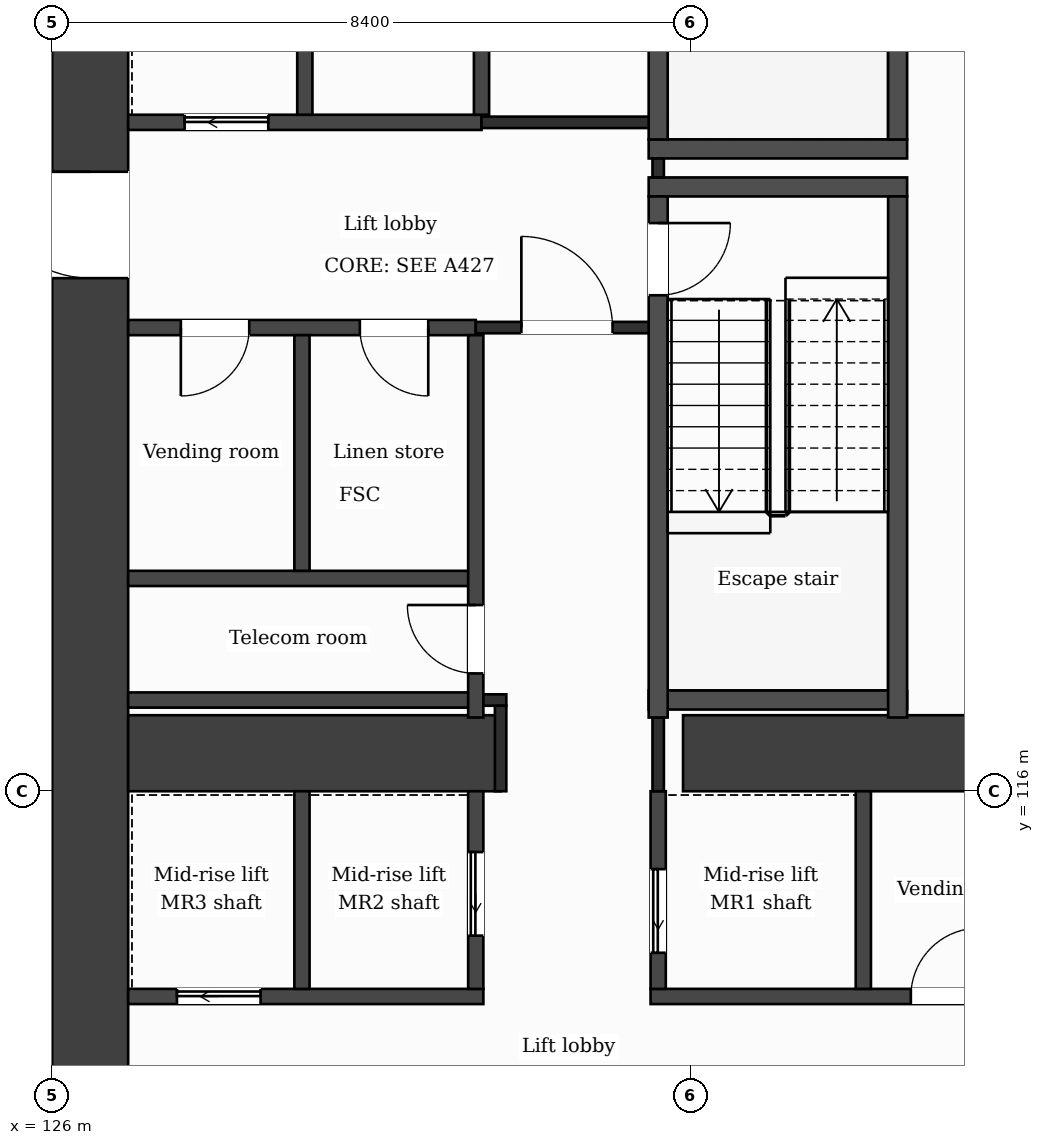
"""IFC4 building model, lengths in metres.
Left out: names, types, materials, properties, quantities, classifications, styles, units other than length and angle.
Written with IfcOpenShell. Run it as: python <this file> out.ifc"""

import sys

from ifc_helpers import new_model, si_unit, direction, frame, frame_2d, origin, place, context, subcontext, project, spatial, rectangle, extrude, element, fill, save


model = new_model("IFC4")
c1 = context("Model", 3, precision=1e-05, world=origin(), true_north=direction((0.0, 1.0)))
c2 = subcontext(c1, "Body", "Model", "MODEL_VIEW")
j1 = project(units=[si_unit("LENGTHUNIT", "METRE"), si_unit("PLANEANGLEUNIT", "RADIAN")], contexts=[c1])
p1 = place(None, origin())
s1 = spatial("IfcSite", under=j1, at=p1, CompositionType="ELEMENT")
p2 = place(p1, origin())
s2 = spatial("IfcBuilding", under=s1, at=p2, CompositionType="ELEMENT")
p3 = place(p2, frame((0.0, 0.0, 113.2)))
s3 = spatial("IfcBuildingStorey", under=s2, at=p3, CompositionType="ELEMENT", Elevation=113.2)
p4 = place(p3, frame((137.732, 131.9, 0.0), z_axis=(0.0, 0.0, 1.0), x_axis=(0.133411141623, -0.991060778808, 0.0)))
e1 = element("IfcWall", 1, at=p4, inside=s3, PredefinedType="SHEAR", context=c2, shape_type="SweptSolid", body=[
    extrude(rectangle(XDim=21.189, YDim=1.0, at=frame_2d((10.595, 0.0))), origin(), (0.0, 0.0, 1.0), 3.7),
])
p5 = place(p3, frame((126.5, 110.9, 0.0), z_axis=(0.0, 0.0, 1.0), x_axis=(0.0, 1.0, 0.0)))
e2 = element("IfcWall", 2, at=p5, inside=s3, PredefinedType="SHEAR", context=c2, shape_type="SweptSolid", body=[
    extrude(rectangle(XDim=21.0, YDim=1.0, at=frame_2d((10.5, 0.0))), origin(), (0.0, 0.0, 1.0), 3.7),
])
p6 = place(p5, frame((11.85, 0.0, 0.0)))
e3 = element("IfcOpeningElement", 3, at=p6, cuts=e2, PredefinedType="OPENING", context=c2, shape_type="SweptSolid", body=[
    extrude(rectangle(XDim=1.4, YDim=2.1, at=frame_2d((0.7, 1.05))), frame((0.0, 0.51, 0.0), z_axis=(0.0, -1.0, 0.0), x_axis=(1.0, 0.0, 0.0)), (0.0, 0.0, 1.0), 1.02),
])
p7 = place(p3, frame((127.0, 116.5, 0.0), z_axis=(0.0, 0.0, 1.0), x_axis=(1.0, 0.0, 0.0)))
e4 = element("IfcWall", 4, at=p7, inside=s3, PredefinedType="SHEAR", context=c2, shape_type="SweptSolid", body=[
    extrude(rectangle(XDim=4.9, YDim=1.0, at=frame_2d((2.45, 0.0))), origin(), (0.0, 0.0, 1.0), 3.7),
])
p8 = place(p3, frame((134.3, 116.5, 0.0), z_axis=(0.0, 0.0, 1.0), x_axis=(1.0, 0.0, 0.0)))
e5 = element("IfcWall", 5, at=p8, inside=s3, PredefinedType="SHEAR", context=c2, shape_type="SweptSolid", body=[
    extrude(rectangle(XDim=5.077, YDim=1.0, at=frame_2d((2.539, 0.0))), origin(), (0.0, 0.0, 1.0), 3.7),
])
p9 = place(p3, frame((127.0, 113.3, 0.0), z_axis=(0.0, 0.0, 1.0), x_axis=(1.0, 0.0, 0.0)))
e6 = element("IfcWall", 6, at=p9, inside=s3, PredefinedType="PARTITIONING", context=c2, shape_type="SweptSolid", body=[
    extrude(rectangle(XDim=4.673, YDim=0.2, at=frame_2d((2.336, 0.0))), origin(), (0.0, 0.0, 1.0), 3.38),
])
p10 = place(p9, frame((0.642, 0.0, 0.0)))
e7 = element("IfcOpeningElement", 7, at=p10, cuts=e6, PredefinedType="OPENING", context=c2, shape_type="SweptSolid", body=[
    extrude(rectangle(XDim=1.1, YDim=2.1, at=frame_2d((0.55, 1.05))), frame((0.0, 0.11, 0.0), z_axis=(0.0, -1.0, 0.0), x_axis=(1.0, 0.0, 0.0)), (0.0, 0.0, 1.0), 0.22),
])
p11 = place(p3, frame((133.873, 113.3, 0.0), z_axis=(0.0, 0.0, 1.0), x_axis=(1.0, 0.0, 0.0)))
e8 = element("IfcWall", 8, at=p11, inside=s3, PredefinedType="PARTITIONING", context=c2, shape_type="SweptSolid", body=[
    extrude(rectangle(XDim=5.888, YDim=0.2, at=frame_2d((2.944, 0.0))), origin(), (0.0, 0.0, 1.0), 3.38),
])
p12 = place(p11, frame((3.424, 0.0, 0.0)))
e9 = element("IfcOpeningElement", 9, at=p12, cuts=e8, PredefinedType="OPENING", context=c2, shape_type="SweptSolid", body=[
    extrude(rectangle(XDim=0.9, YDim=2.1, at=frame_2d((0.45, 1.05))), frame((0.0, 0.11, 0.0), z_axis=(0.0, -1.0, 0.0), x_axis=(1.0, 0.0, 0.0)), (0.0, 0.0, 1.0), 0.22),
])
p13 = place(p3, frame((127.0, 117.2, 0.0), z_axis=(0.0, 0.0, 1.0), x_axis=(1.0, 0.0, 0.0)))
e10 = element("IfcWall", 10, at=p13, inside=s3, PredefinedType="PARTITIONING", context=c2, shape_type="SweptSolid", body=[
    extrude(rectangle(XDim=4.573, YDim=0.2, at=frame_2d((2.287, 0.0))), origin(), (0.0, 0.0, 1.0), 3.38),
])
p14 = place(p3, frame((131.573, 117.2, 0.0), z_axis=(0.0, 0.0, 1.0), x_axis=(1.0, 0.0, 0.0)))
e11 = element("IfcWall", 11, at=p14, inside=s3, PredefinedType="PARTITIONING", context=c2, shape_type="SweptSolid", body=[
    extrude(rectangle(XDim=0.402, YDim=0.15, at=frame_2d((0.201, 0.0))), origin(), (0.0, 0.0, 1.0), 3.38),
])
p15 = place(p3, frame((133.848, 117.2, 0.0), z_axis=(0.0, 0.0, 1.0), x_axis=(1.0, 0.0, 0.0)))
e12 = element("IfcWall", 12, at=p15, inside=s3, PredefinedType="PARTITIONING", context=c2, shape_type="SweptSolid", body=[
    extrude(rectangle(XDim=3.4, YDim=0.25, at=frame_2d((1.7, 0.0))), origin(), (0.0, 0.0, 1.0), 3.38),
])
p16 = place(p3, frame((127.0, 118.8, 0.0), z_axis=(0.0, 0.0, 1.0), x_axis=(1.0, 0.0, 0.0)))
e13 = element("IfcWall", 13, at=p16, inside=s3, PredefinedType="PARTITIONING", context=c2, shape_type="SweptSolid", body=[
    extrude(rectangle(XDim=4.573, YDim=0.2, at=frame_2d((2.287, 0.0))), origin(), (0.0, 0.0, 1.0), 3.38),
])
p17 = place(p3, frame((127.0, 122.1, 0.0), z_axis=(0.0, 0.0, 1.0), x_axis=(1.0, 0.0, 0.0)))
e14 = element("IfcWall", 14, at=p17, inside=s3, PredefinedType="PARTITIONING", context=c2, shape_type="SweptSolid", body=[
    extrude(rectangle(XDim=4.573, YDim=0.2, at=frame_2d((2.287, 0.0))), origin(), (0.0, 0.0, 1.0), 3.38),
])
p18 = place(p17, frame((3.048, 0.0, 0.0)))
e15 = element("IfcOpeningElement", 15, at=p18, cuts=e14, PredefinedType="OPENING", context=c2, shape_type="SweptSolid", body=[
    extrude(rectangle(XDim=0.9, YDim=2.1, at=frame_2d((0.45, 1.05))), frame((0.0, 0.11, 0.0), z_axis=(0.0, -1.0, 0.0), x_axis=(1.0, 0.0, 0.0)), (0.0, 0.0, 1.0), 0.22),
])
p19 = place(p17, frame((0.693, 0.0, 0.0)))
e16 = element("IfcOpeningElement", 16, at=p19, cuts=e14, PredefinedType="OPENING", context=c2, shape_type="SweptSolid", body=[
    extrude(rectangle(XDim=0.9, YDim=2.1, at=frame_2d((0.45, 1.05))), frame((0.0, 0.11, 0.0), z_axis=(0.0, -1.0, 0.0), x_axis=(1.0, 0.0, 0.0)), (0.0, 0.0, 1.0), 0.22),
])
p20 = place(p3, frame((131.573, 122.1, 0.0), z_axis=(0.0, 0.0, 1.0), x_axis=(1.0, 0.0, 0.0)))
e17 = element("IfcWall", 17, at=p20, inside=s3, PredefinedType="PARTITIONING", context=c2, shape_type="SweptSolid", body=[
    extrude(rectangle(XDim=2.4, YDim=0.15, at=frame_2d((1.2, 0.0))), origin(), (0.0, 0.0, 1.0), 3.38),
])
p21 = place(p20, frame((0.6, 0.0, 0.0)))
e18 = element("IfcOpeningElement", 18, at=p21, cuts=e17, PredefinedType="OPENING", context=c2, shape_type="SweptSolid", body=[
    extrude(rectangle(XDim=1.2, YDim=2.1, at=frame_2d((0.6, 1.05))), frame((0.0, 0.085, 0.0), z_axis=(0.0, -1.0, 0.0), x_axis=(1.0, 0.0, 0.0)), (0.0, 0.0, 1.0), 0.17),
])
p22 = place(p3, frame((100.8, 122.45, 0.0), z_axis=(0.0, 0.0, 1.0), x_axis=(1.0, 0.0, 0.0)))
e19 = element("IfcWall", 19, at=p22, inside=s3, PredefinedType="PARTITIONING", context=c2, shape_type="SweptSolid", body=[
    extrude(rectangle(XDim=25.2, YDim=0.15, at=frame_2d((12.6, 0.0))), origin(), (0.0, 0.0, 1.0), 3.38),
])
for number, where, z_axis, x_axis in (
    (20, (133.848, 123.95, 0.0), (0.0, 0.0, 1.0), (1.0, 0.0, 0.0)),
    (21, (133.848, 124.45, 0.0), (0.0, 0.0, 1.0), (1.0, 0.0, 0.0)),
):
    element("IfcWall", number, at=place(p3, frame(where, z_axis=z_axis, x_axis=x_axis)), inside=s3, PredefinedType="PARTITIONING", context=c2, shape_type="SweptSolid", body=[
        extrude(rectangle(XDim=3.4, YDim=0.25, at=frame_2d((1.7, 0.0))), origin(), (0.0, 0.0, 1.0), 3.38),
    ])
p23 = place(p3, frame((100.8, 124.45, 0.0), z_axis=(0.0, 0.0, 1.0), x_axis=(1.0, 0.0, 0.0)))
e22 = element("IfcWall", 22, at=p23, inside=s3, PredefinedType="PARTITIONING", context=c2, shape_type="SweptSolid", body=[
    extrude(rectangle(XDim=25.2, YDim=0.15, at=frame_2d((12.6, 0.0))), origin(), (0.0, 0.0, 1.0), 3.38),
])
p24 = place(p23, frame((3.7, 0.0, 0.0)))
e23 = element("IfcOpeningElement", 23, at=p24, cuts=e22, PredefinedType="OPENING", context=c2, shape_type="SweptSolid", body=[
    extrude(rectangle(XDim=1.0, YDim=2.1, at=frame_2d((0.5, 1.05))), frame((0.0, 0.085, 0.0), z_axis=(0.0, -1.0, 0.0), x_axis=(1.0, 0.0, 0.0)), (0.0, 0.0, 1.0), 0.17),
])
p25 = place(p23, frame((9.75, 0.0, 0.0)))
e24 = element("IfcOpeningElement", 24, at=p25, cuts=e22, PredefinedType="OPENING", context=c2, shape_type="SweptSolid", body=[
    extrude(rectangle(XDim=1.0, YDim=2.1, at=frame_2d((0.5, 1.05))), frame((0.0, 0.085, 0.0), z_axis=(0.0, -1.0, 0.0), x_axis=(1.0, 0.0, 0.0)), (0.0, 0.0, 1.0), 0.17),
])
p26 = place(p23, frame((13.575, 0.0, 0.0)))
e25 = element("IfcOpeningElement", 25, at=p26, cuts=e22, PredefinedType="OPENING", context=c2, shape_type="SweptSolid", body=[
    extrude(rectangle(XDim=1.0, YDim=2.1, at=frame_2d((0.5, 1.05))), frame((0.0, 0.085, 0.0), z_axis=(0.0, -1.0, 0.0), x_axis=(1.0, 0.0, 0.0)), (0.0, 0.0, 1.0), 0.17),
])
p27 = place(p23, frame((18.125, 0.0, 0.0)))
e26 = element("IfcOpeningElement", 26, at=p27, cuts=e22, PredefinedType="OPENING", context=c2, shape_type="SweptSolid", body=[
    extrude(rectangle(XDim=1.0, YDim=2.1, at=frame_2d((0.5, 1.05))), frame((0.0, 0.085, 0.0), z_axis=(0.0, -1.0, 0.0), x_axis=(1.0, 0.0, 0.0)), (0.0, 0.0, 1.0), 0.17),
])
p28 = place(p23, frame((22.35, 0.0, 0.0)))
e27 = element("IfcOpeningElement", 27, at=p28, cuts=e22, PredefinedType="OPENING", context=c2, shape_type="SweptSolid", body=[
    extrude(rectangle(XDim=1.0, YDim=2.1, at=frame_2d((0.5, 1.05))), frame((0.0, 0.085, 0.0), z_axis=(0.0, -1.0, 0.0), x_axis=(1.0, 0.0, 0.0)), (0.0, 0.0, 1.0), 0.17),
])
p29 = place(p3, frame((127.0, 124.8, 0.0), z_axis=(0.0, 0.0, 1.0), x_axis=(1.0, 0.0, 0.0)))
e28 = element("IfcWall", 28, at=p29, inside=s3, PredefinedType="PARTITIONING", context=c2, shape_type="SweptSolid", body=[
    extrude(rectangle(XDim=4.649, YDim=0.2, at=frame_2d((2.324, 0.0))), origin(), (0.0, 0.0, 1.0), 3.38),
])
p30 = place(p29, frame((0.743, 0.0, 0.0)))
e29 = element("IfcOpeningElement", 29, at=p30, cuts=e28, PredefinedType="OPENING", context=c2, shape_type="SweptSolid", body=[
    extrude(rectangle(XDim=1.1, YDim=2.1, at=frame_2d((0.55, 1.05))), frame((0.0, 0.11, 0.0), z_axis=(0.0, -1.0, 0.0), x_axis=(1.0, 0.0, 0.0)), (0.0, 0.0, 1.0), 0.22),
])
p31 = place(p3, frame((131.649, 124.8, 0.0), z_axis=(0.0, 0.0, 1.0), x_axis=(1.0, 0.0, 0.0)))
e30 = element("IfcWall", 30, at=p31, inside=s3, PredefinedType="PARTITIONING", context=c2, shape_type="SweptSolid", body=[
    extrude(rectangle(XDim=2.449, YDim=0.15, at=frame_2d((1.225, 0.0))), origin(), (0.0, 0.0, 1.0), 3.38),
])
p32 = place(p3, frame((129.287, 113.4, 0.0), z_axis=(0.0, 0.0, 1.0), x_axis=(0.0, 1.0, 0.0)))
e31 = element("IfcWall", 31, at=p32, inside=s3, PredefinedType="PARTITIONING", context=c2, shape_type="SweptSolid", body=[
    extrude(rectangle(XDim=2.6, YDim=0.2, at=frame_2d((1.3, 0.0))), origin(), (0.0, 0.0, 1.0), 3.38),
])
for number, where, z_axis, x_axis in (
    (32, (129.287, 118.9, 0.0), (0.0, 0.0, 1.0), (0.0, 1.0, 0.0)),
    (33, (129.324, 124.9, 0.0), (0.0, 0.0, 1.0), (0.0, 1.0, 0.0)),
):
    element("IfcWall", number, at=place(p3, frame(where, z_axis=z_axis, x_axis=x_axis)), inside=s3, PredefinedType="PARTITIONING", context=c2, shape_type="SweptSolid", body=[
        extrude(rectangle(XDim=3.1, YDim=0.2, at=frame_2d((1.55, 0.0))), origin(), (0.0, 0.0, 1.0), 3.38),
    ])
p33 = place(p3, frame((131.573, 113.4, 0.0), z_axis=(0.0, 0.0, 1.0), x_axis=(0.0, 1.0, 0.0)))
e34 = element("IfcWall", 34, at=p33, inside=s3, PredefinedType="PARTITIONING", context=c2, shape_type="SweptSolid", body=[
    extrude(rectangle(XDim=2.6, YDim=0.2, at=frame_2d((1.3, 0.0))), origin(), (0.0, 0.0, 1.0), 3.38),
])
p34 = place(p33, frame((0.7, 0.0, 0.0)))
e35 = element("IfcOpeningElement", 35, at=p34, cuts=e34, PredefinedType="OPENING", context=c2, shape_type="SweptSolid", body=[
    extrude(rectangle(XDim=1.1, YDim=2.1, at=frame_2d((0.55, 1.05))), frame((0.0, 0.11, 0.0), z_axis=(0.0, -1.0, 0.0), x_axis=(1.0, 0.0, 0.0)), (0.0, 0.0, 1.0), 0.22),
])
p35 = place(p3, frame((131.573, 116.97, 0.0), z_axis=(0.0, 0.0, 1.0), x_axis=(0.0, 1.0, 0.0)))
e36 = element("IfcWall", 36, at=p35, inside=s3, PredefinedType="PARTITIONING", context=c2, shape_type="SweptSolid", body=[
    extrude(rectangle(XDim=5.03, YDim=0.2, at=frame_2d((2.515, 0.0))), origin(), (0.0, 0.0, 1.0), 3.38),
])
p36 = place(p35, frame((0.58, 0.0, 0.0)))
e37 = element("IfcOpeningElement", 37, at=p36, cuts=e36, PredefinedType="OPENING", context=c2, shape_type="SweptSolid", body=[
    extrude(rectangle(XDim=0.9, YDim=2.1, at=frame_2d((0.45, 1.05))), frame((0.0, 0.11, 0.0), z_axis=(0.0, -1.0, 0.0), x_axis=(1.0, 0.0, 0.0)), (0.0, 0.0, 1.0), 0.22),
])
p37 = place(p3, frame((131.649, 124.9, 0.0), z_axis=(0.0, 0.0, 1.0), x_axis=(0.0, 1.0, 0.0)))
e38 = element("IfcWall", 38, at=p37, inside=s3, PredefinedType="PARTITIONING", context=c2, shape_type="SweptSolid", body=[
    extrude(rectangle(XDim=3.1, YDim=0.2, at=frame_2d((1.55, 0.0))), origin(), (0.0, 0.0, 1.0), 3.38),
])
p38 = place(p3, frame((131.9, 116.0, 0.0), z_axis=(0.0, 0.0, 1.0), x_axis=(0.0, 1.0, 0.0)))
e39 = element("IfcWall", 39, at=p38, inside=s3, PredefinedType="PARTITIONING", context=c2, shape_type="SweptSolid", body=[
    extrude(rectangle(XDim=1.125, YDim=0.15, at=frame_2d((0.562, 0.0))), origin(), (0.0, 0.0, 1.0), 3.38),
])
p39 = place(p3, frame((133.973, 113.4, 0.0), z_axis=(0.0, 0.0, 1.0), x_axis=(0.0, 1.0, 0.0)))
e40 = element("IfcWall", 40, at=p39, inside=s3, PredefinedType="PARTITIONING", context=c2, shape_type="SweptSolid", body=[
    extrude(rectangle(XDim=2.6, YDim=0.2, at=frame_2d((1.3, 0.0))), origin(), (0.0, 0.0, 1.0), 3.38),
])
p40 = place(p39, frame((0.475, 0.0, 0.0)))
e41 = element("IfcOpeningElement", 41, at=p40, cuts=e40, PredefinedType="OPENING", context=c2, shape_type="SweptSolid", body=[
    extrude(rectangle(XDim=1.1, YDim=2.1, at=frame_2d((0.55, 1.05))), frame((0.0, 0.11, 0.0), z_axis=(0.0, -1.0, 0.0), x_axis=(1.0, 0.0, 0.0)), (0.0, 0.0, 1.0), 0.22),
])
p41 = place(p3, frame((133.973, 116.0, 0.0), z_axis=(0.0, 0.0, 1.0), x_axis=(0.0, 1.0, 0.0)))
e42 = element("IfcWall", 42, at=p41, inside=s3, PredefinedType="PARTITIONING", context=c2, shape_type="SweptSolid", body=[
    extrude(rectangle(XDim=0.97, YDim=0.15, at=frame_2d((0.485, 0.0))), origin(), (0.0, 0.0, 1.0), 3.38),
])
p42 = place(p3, frame((133.973, 124.075, 0.0), z_axis=(0.0, 0.0, 1.0), x_axis=(0.0, 1.0, 0.0)))
e43 = element("IfcWall", 43, at=p42, inside=s3, PredefinedType="PARTITIONING", context=c2, shape_type="SweptSolid", body=[
    extrude(rectangle(XDim=0.25, YDim=0.15, at=frame_2d((0.125, 0.0))), origin(), (0.0, 0.0, 1.0), 3.38),
])
p43 = place(p3, frame((133.973, 116.97, 0.0), z_axis=(0.0, 0.0, 1.0), x_axis=(0.0, 1.0, 0.0)))
e44 = element("IfcWall", 44, at=p43, inside=s3, PredefinedType="PARTITIONING", context=c2, shape_type="SweptSolid", body=[
    extrude(rectangle(XDim=6.855, YDim=0.25, at=frame_2d((3.427, 0.0))), origin(), (0.0, 0.0, 1.0), 3.38),
])
p44 = place(p43, frame((5.555, 0.0, 0.0)))
e45 = element("IfcOpeningElement", 45, at=p44, cuts=e44, PredefinedType="OPENING", context=c2, shape_type="SweptSolid", body=[
    extrude(rectangle(XDim=0.95, YDim=2.1, at=frame_2d((0.475, 1.05))), frame((0.0, 0.135, 0.0), z_axis=(0.0, -1.0, 0.0), x_axis=(1.0, 0.0, 0.0)), (0.0, 0.0, 1.0), 0.27),
])
p45 = place(p3, frame((133.973, 124.575, 0.0), z_axis=(0.0, 0.0, 1.0), x_axis=(0.0, 1.0, 0.0)))
e46 = element("IfcWall", 46, at=p45, inside=s3, PredefinedType="PARTITIONING", context=c2, shape_type="SweptSolid", body=[
    extrude(rectangle(XDim=6.855, YDim=0.25, at=frame_2d((3.427, 0.0))), origin(), (0.0, 0.0, 1.0), 3.38),
])
p46 = place(p45, frame((5.325, 0.0, 0.0)))
e47 = element("IfcOpeningElement", 47, at=p46, cuts=e46, PredefinedType="OPENING", context=c2, shape_type="SweptSolid", body=[
    extrude(rectangle(XDim=1.0, YDim=2.1, at=frame_2d((0.5, 1.05))), frame((0.0, 0.135, 0.0), z_axis=(0.0, -1.0, 0.0), x_axis=(1.0, 0.0, 0.0)), (0.0, 0.0, 1.0), 0.27),
])
p47 = place(p3, frame((136.672, 113.4, 0.0), z_axis=(0.0, 0.0, 1.0), x_axis=(0.0, 1.0, 0.0)))
e48 = element("IfcWall", 48, at=p47, inside=s3, PredefinedType="PARTITIONING", context=c2, shape_type="SweptSolid", body=[
    extrude(rectangle(XDim=2.6, YDim=0.2, at=frame_2d((1.3, 0.0))), origin(), (0.0, 0.0, 1.0), 3.38),
])
for number, where, z_axis, x_axis in (
    (49, (137.123, 116.97, 0.0), (0.0, 0.0, 1.0), (0.0, 1.0, 0.0)),
    (50, (137.123, 124.575, 0.0), (0.0, 0.0, 1.0), (0.0, 1.0, 0.0)),
):
    element("IfcWall", number, at=place(p3, frame(where, z_axis=z_axis, x_axis=x_axis)), inside=s3, PredefinedType="PARTITIONING", context=c2, shape_type="SweptSolid", body=[
        extrude(rectangle(XDim=6.855, YDim=0.25, at=frame_2d((3.427, 0.0))), origin(), (0.0, 0.0, 1.0), 3.38),
    ])
p48 = place(p21, origin())
e51 = element("IfcDoor", 51, at=p48, inside=s3, OperationType="SINGLE_SWING_LEFT", PredefinedType="DOOR", context=c2, shape_type="SweptSolid", body=[
    extrude(rectangle(XDim=1.2, YDim=2.1, at=frame_2d((0.6, 1.05))), frame((0.0, 0.025, 0.0), z_axis=(0.0, -1.0, 0.0), x_axis=(1.0, 0.0, 0.0)), (0.0, 0.0, 1.0), 0.05),
])
fill(e18, e51)
p49 = place(p30, origin())
e52 = element("IfcDoor", 52, at=p49, inside=s3, OperationType="SLIDING_TO_LEFT", PredefinedType="DOOR", context=c2, shape_type="SweptSolid", body=[
    extrude(rectangle(XDim=1.1, YDim=2.1, at=frame_2d((0.55, 1.05))), frame((0.0, 0.025, 0.0), z_axis=(0.0, -1.0, 0.0), x_axis=(1.0, 0.0, 0.0)), (0.0, 0.0, 1.0), 0.05),
])
fill(e29, e52)
p50 = place(p18, origin())
e53 = element("IfcDoor", 53, at=p50, inside=s3, OperationType="SINGLE_SWING_RIGHT", PredefinedType="DOOR", context=c2, shape_type="SweptSolid", body=[
    extrude(rectangle(XDim=0.9, YDim=2.1, at=frame_2d((0.45, 1.05))), frame((0.0, 0.025, 0.0), z_axis=(0.0, -1.0, 0.0), x_axis=(1.0, 0.0, 0.0)), (0.0, 0.0, 1.0), 0.05),
])
fill(e15, e53)
p51 = place(p19, origin())
e54 = element("IfcDoor", 54, at=p51, inside=s3, OperationType="SINGLE_SWING_LEFT", PredefinedType="DOOR", context=c2, shape_type="SweptSolid", body=[
    extrude(rectangle(XDim=0.9, YDim=2.1, at=frame_2d((0.45, 1.05))), frame((0.0, 0.025, 0.0), z_axis=(0.0, -1.0, 0.0), x_axis=(1.0, 0.0, 0.0)), (0.0, 0.0, 1.0), 0.05),
])
fill(e16, e54)
p52 = place(p44, origin())
e55 = element("IfcDoor", 55, at=p52, inside=s3, OperationType="SINGLE_SWING_RIGHT", PredefinedType="DOOR", context=c2, shape_type="SweptSolid", body=[
    extrude(rectangle(XDim=0.95, YDim=2.1, at=frame_2d((0.475, 1.05))), frame((0.0, 0.025, 0.0), z_axis=(0.0, -1.0, 0.0), x_axis=(1.0, 0.0, 0.0)), (0.0, 0.0, 1.0), 0.05),
])
fill(e45, e55)
p53 = place(p36, origin())
e56 = element("IfcDoor", 56, at=p53, inside=s3, OperationType="SINGLE_SWING_RIGHT", PredefinedType="DOOR", context=c2, shape_type="SweptSolid", body=[
    extrude(rectangle(XDim=0.9, YDim=2.1, at=frame_2d((0.45, 1.05))), frame((0.0, 0.025, 0.0), z_axis=(0.0, -1.0, 0.0), x_axis=(1.0, 0.0, 0.0)), (0.0, 0.0, 1.0), 0.05),
])
fill(e37, e56)
p54 = place(p40, origin())
e57 = element("IfcDoor", 57, at=p54, inside=s3, OperationType="SLIDING_TO_LEFT", PredefinedType="DOOR", context=c2, shape_type="SweptSolid", body=[
    extrude(rectangle(XDim=1.1, YDim=2.1, at=frame_2d((0.55, 1.05))), frame((0.0, 0.025, 0.0), z_axis=(0.0, -1.0, 0.0), x_axis=(1.0, 0.0, 0.0)), (0.0, 0.0, 1.0), 0.05),
])
fill(e41, e57)
p55 = place(p34, origin())
e58 = element("IfcDoor", 58, at=p55, inside=s3, OperationType="SLIDING_TO_LEFT", PredefinedType="DOOR", context=c2, shape_type="SweptSolid", body=[
    extrude(rectangle(XDim=1.1, YDim=2.1, at=frame_2d((0.55, 1.05))), frame((0.0, 0.025, 0.0), z_axis=(0.0, -1.0, 0.0), x_axis=(1.0, 0.0, 0.0)), (0.0, 0.0, 1.0), 0.05),
])
fill(e35, e58)
p56 = place(p10, origin())
e59 = element("IfcDoor", 59, at=p56, inside=s3, OperationType="SLIDING_TO_LEFT", PredefinedType="DOOR", context=c2, shape_type="SweptSolid", body=[
    extrude(rectangle(XDim=1.1, YDim=2.1, at=frame_2d((0.55, 1.05))), frame((0.0, 0.025, 0.0), z_axis=(0.0, -1.0, 0.0), x_axis=(1.0, 0.0, 0.0)), (0.0, 0.0, 1.0), 0.05),
])
fill(e7, e59)
p57 = place(p12, origin())
e60 = element("IfcDoor", 60, at=p57, inside=s3, OperationType="SINGLE_SWING_RIGHT", PredefinedType="DOOR", context=c2, shape_type="SweptSolid", body=[
    extrude(rectangle(XDim=0.9, YDim=2.1, at=frame_2d((0.45, 1.05))), frame((0.0, 0.025, 0.0), z_axis=(0.0, -1.0, 0.0), x_axis=(1.0, 0.0, 0.0)), (0.0, 0.0, 1.0), 0.05),
])
fill(e9, e60)
p58 = place(p6, origin())
e61 = element("IfcDoor", 61, at=p58, inside=s3, OperationType="SINGLE_SWING_RIGHT", PredefinedType="DOOR", context=c2, shape_type="SweptSolid", body=[
    extrude(rectangle(XDim=1.4, YDim=2.1, at=frame_2d((0.7, 1.05))), frame((0.0, 0.025, 0.0), z_axis=(0.0, -1.0, 0.0), x_axis=(1.0, 0.0, 0.0)), (0.0, 0.0, 1.0), 0.05),
])
fill(e3, e61)
save(model, sys.argv[1])
